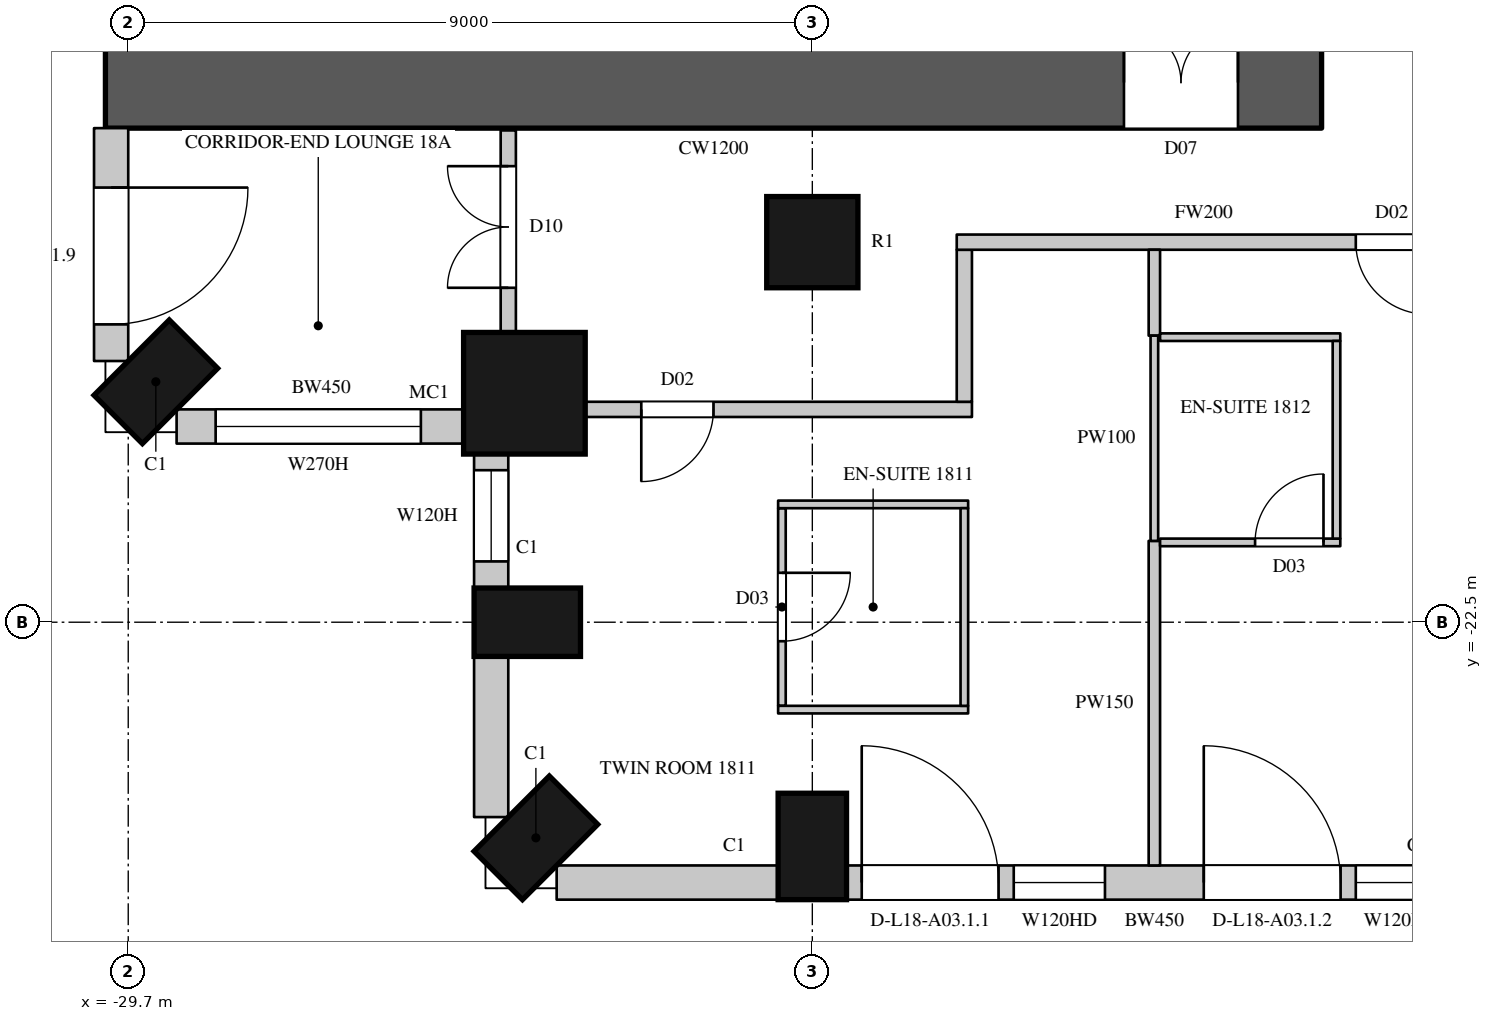
"""IFC4 building model, lengths in metres.
Left out: names, types, materials, properties, quantities, classifications, styles, units other than length and angle.
Written with IfcOpenShell. Run it as: python <this file> out.ifc"""

import sys

from ifc_helpers import new_model, si_unit, direction, frame, frame_2d, origin, origin_2d, place, context, subcontext, project, spatial, rectangle, circle, extrude, element, fill, save


model = new_model("IFC4")
c1 = context("Model", 3, precision=1e-05, world=origin(), true_north=direction((0.0, 1.0)))
c2 = subcontext(c1, "Body", "Model", "MODEL_VIEW")
j1 = project(units=[si_unit("LENGTHUNIT", "METRE"), si_unit("PLANEANGLEUNIT", "RADIAN")], contexts=[c1])
p1 = place(None, origin())
s1 = spatial("IfcSite", under=j1, at=p1, CompositionType="ELEMENT")
p2 = place(p1, origin())
s2 = spatial("IfcBuilding", under=s1, at=p2, CompositionType="ELEMENT")
p3 = place(p2, frame((0.0, 0.0, 95.1)))
s3 = spatial("IfcBuildingStorey", under=s2, at=p3, CompositionType="ELEMENT", Elevation=95.1)
p4 = place(p3, frame((-29.337, -19.337, 0.0), z_axis=(0.0, 0.0, 1.0), x_axis=(0.707106781187, -0.707106781187, 0.0)))
e1 = element("IfcColumn", 1, at=p4, inside=s3, PredefinedType="COLUMN", context=c2, shape_type="SweptSolid", body=[
    extrude(rectangle(XDim=0.9, YDim=1.4, at=origin_2d()), origin(), (0.0, 0.0, 1.0), 3.6),
])
p5 = place(p3, frame((-24.488, -19.488, 0.0), z_axis=(0.0, 0.0, 1.0), x_axis=(1.0, 0.0, 0.0)))
e2 = element("IfcColumn", 2, at=p5, inside=s3, PredefinedType="COLUMN", context=c2, shape_type="SweptSolid", body=[
    extrude(circle(Radius=0.8, at=origin_2d()), origin(), (0.0, 0.0, 1.0), 3.6),
])
for number, where, z_axis, x_axis in (
    (3, (-24.45, -22.5, 0.0), (0.0, 0.0, 1.0), (0.0, -1.0, 0.0)),
    (4, (-24.337, -25.337, 0.0), (0.0, 0.0, 1.0), (0.707, -0.707, 0.0)),
    (5, (-20.7, -25.45, 0.0), (0.0, 0.0, 1.0), (1.0, 0.0, 0.0)),
):
    element("IfcColumn", number, at=place(p3, frame(where, z_axis=z_axis, x_axis=x_axis)), inside=s3, PredefinedType="COLUMN", context=c2, shape_type="SweptSolid", body=[
        extrude(rectangle(XDim=0.9, YDim=1.4, at=origin_2d()), origin(), (0.0, 0.0, 1.0), 3.6),
    ])
p6 = place(p3, frame((-20.7, -17.5, 0.0), z_axis=(0.0, 0.0, 1.0), x_axis=(1.0, 0.0, 0.0)))
e6 = element("IfcColumn", 6, at=p6, inside=s3, PredefinedType="COLUMN", context=c2, shape_type="SweptSolid", body=[
    extrude(circle(Radius=0.6, at=origin_2d()), origin(), (0.0, 0.0, 1.0), 3.6),
])
p7 = place(p3, frame((-29.925, -16.0, 0.0), z_axis=(0.0, 0.0, 1.0), x_axis=(0.0, -1.0, 0.0)))
e7 = element("IfcWall", 7, at=p7, inside=s3, PredefinedType="SOLIDWALL", context=c2, shape_type="SweptSolid", body=[
    extrude(rectangle(XDim=3.064, YDim=0.45, at=frame_2d((1.532, 0.0))), origin(), (0.0, 0.0, 1.0), 3.3),
])
p8 = place(p7, frame((0.782, 0.0, 0.0)))
e8 = element("IfcOpeningElement", 8, at=p8, cuts=e7, PredefinedType="OPENING", context=c2, shape_type="SweptSolid", body=[
    extrude(rectangle(XDim=1.8, YDim=2.4, at=frame_2d((0.9, 1.2))), frame((0.0, 0.235, 0.0), z_axis=(0.0, -1.0, 0.0), x_axis=(1.0, 0.0, 0.0)), (0.0, 0.0, 1.0), 0.47),
])
p9 = place(p3, frame((-29.064, -19.925, 0.0), z_axis=(0.0, 0.0, 1.0), x_axis=(1.0, 0.0, 0.0)))
e9 = element("IfcWall", 9, at=p9, inside=s3, PredefinedType="SOLIDWALL", context=c2, shape_type="SweptSolid", body=[
    extrude(rectangle(XDim=3.805, YDim=0.45, at=frame_2d((1.903, 0.0))), origin(), (0.0, 0.0, 1.0), 3.3),
])
p10 = place(p9, frame((0.514, 0.0, 1.05)))
e10 = element("IfcOpeningElement", 10, at=p10, cuts=e9, PredefinedType="OPENING", context=c2, shape_type="SweptSolid", body=[
    extrude(rectangle(XDim=2.7, YDim=2.0, at=frame_2d((1.35, 1.0))), frame((0.0, 0.235, 0.0), z_axis=(0.0, -1.0, 0.0), x_axis=(1.0, 0.0, 0.0)), (0.0, 0.0, 1.0), 0.47),
])
p11 = place(p3, frame((-24.925, -20.259, 0.0), z_axis=(0.0, 0.0, 1.0), x_axis=(0.0, -1.0, 0.0)))
e11 = element("IfcWall", 11, at=p11, inside=s3, PredefinedType="SOLIDWALL", context=c2, shape_type="SweptSolid", body=[
    extrude(rectangle(XDim=1.792, YDim=0.45, at=frame_2d((0.896, 0.0))), origin(), (0.0, 0.0, 1.0), 3.3),
])
p12 = place(p11, frame((0.241, 0.0, 1.05)))
e12 = element("IfcOpeningElement", 12, at=p12, cuts=e11, PredefinedType="OPENING", context=c2, shape_type="SweptSolid", body=[
    extrude(rectangle(XDim=1.2, YDim=2.0, at=frame_2d((0.6, 1.0))), frame((0.0, 0.235, 0.0), z_axis=(0.0, -1.0, 0.0), x_axis=(1.0, 0.0, 0.0)), (0.0, 0.0, 1.0), 0.47),
])
p13 = place(p3, frame((-24.925, -22.95, 0.0), z_axis=(0.0, 0.0, 1.0), x_axis=(0.0, -1.0, 0.0)))
e13 = element("IfcWall", 13, at=p13, inside=s3, PredefinedType="SOLIDWALL", context=c2, shape_type="SweptSolid", body=[
    extrude(rectangle(XDim=2.114, YDim=0.45, at=frame_2d((1.057, 0.0))), origin(), (0.0, 0.0, 1.0), 3.3),
])
p14 = place(p3, frame((-24.064, -25.925, 0.0), z_axis=(0.0, 0.0, 1.0), x_axis=(1.0, 0.0, 0.0)))
e14 = element("IfcWall", 14, at=p14, inside=s3, PredefinedType="SOLIDWALL", context=c2, shape_type="SweptSolid", body=[
    extrude(rectangle(XDim=2.914, YDim=0.45, at=frame_2d((1.457, 0.0))), origin(), (0.0, 0.0, 1.0), 3.3),
])
p15 = place(p3, frame((-20.25, -25.925, 0.0), z_axis=(0.0, 0.0, 1.0), x_axis=(1.0, 0.0, 0.0)))
e15 = element("IfcWall", 15, at=p15, inside=s3, PredefinedType="SOLIDWALL", context=c2, shape_type="SweptSolid", body=[
    extrude(rectangle(XDim=8.1, YDim=0.45, at=frame_2d((4.05, 0.0))), origin(), (0.0, 0.0, 1.0), 3.3),
])
p16 = place(p15, frame((0.2, 0.0, 0.0)))
e16 = element("IfcOpeningElement", 16, at=p16, cuts=e15, PredefinedType="OPENING", context=c2, shape_type="SweptSolid", body=[
    extrude(rectangle(XDim=1.8, YDim=2.4, at=frame_2d((0.9, 1.2))), frame((0.0, 0.235, 0.0), z_axis=(0.0, -1.0, 0.0), x_axis=(1.0, 0.0, 0.0)), (0.0, 0.0, 1.0), 0.47),
])
p17 = place(p15, frame((2.2, 0.0, 1.05)))
e17 = element("IfcOpeningElement", 17, at=p17, cuts=e15, PredefinedType="OPENING", context=c2, shape_type="SweptSolid", body=[
    extrude(rectangle(XDim=1.2, YDim=2.0, at=frame_2d((0.6, 1.0))), frame((0.0, 0.235, 0.0), z_axis=(0.0, -1.0, 0.0), x_axis=(1.0, 0.0, 0.0)), (0.0, 0.0, 1.0), 0.47),
])
p18 = place(p15, frame((4.7, 0.0, 0.0)))
e18 = element("IfcOpeningElement", 18, at=p18, cuts=e15, PredefinedType="OPENING", context=c2, shape_type="SweptSolid", body=[
    extrude(rectangle(XDim=1.8, YDim=2.4, at=frame_2d((0.9, 1.2))), frame((0.0, 0.235, 0.0), z_axis=(0.0, -1.0, 0.0), x_axis=(1.0, 0.0, 0.0)), (0.0, 0.0, 1.0), 0.47),
])
p19 = place(p15, frame((6.7, 0.0, 1.05)))
e19 = element("IfcOpeningElement", 19, at=p19, cuts=e15, PredefinedType="OPENING", context=c2, shape_type="SweptSolid", body=[
    extrude(rectangle(XDim=1.2, YDim=2.0, at=frame_2d((0.6, 1.0))), frame((0.0, 0.235, 0.0), z_axis=(0.0, -1.0, 0.0), x_axis=(1.0, 0.0, 0.0)), (0.0, 0.0, 1.0), 0.47),
])
p20 = place(p3, frame((-30.0, -15.4, 0.0), z_axis=(0.0, 0.0, 1.0), x_axis=(1.0, 0.0, 0.0)))
e20 = element("IfcWall", 20, at=p20, inside=s3, PredefinedType="SHEAR", context=c2, shape_type="SweptSolid", body=[
    extrude(rectangle(XDim=16.0, YDim=1.2, at=frame_2d((8.0, 0.0))), origin(), (0.0, 0.0, 1.0), 3.6),
])
p21 = place(p20, frame((13.4, 0.0, 0.0)))
e21 = element("IfcOpeningElement", 21, at=p21, cuts=e20, PredefinedType="OPENING", context=c2, shape_type="SweptSolid", body=[
    extrude(rectangle(XDim=1.5, YDim=2.4, at=frame_2d((0.75, 1.2))), frame((0.0, 0.61, 0.0), z_axis=(0.0, -1.0, 0.0), x_axis=(1.0, 0.0, 0.0)), (0.0, 0.0, 1.0), 1.22),
])
p22 = place(p3, frame((-24.7, -18.7, 0.0), z_axis=(0.0, 0.0, 1.0), x_axis=(0.0, 1.0, 0.0)))
e22 = element("IfcWall", 22, at=p22, inside=s3, PredefinedType="PARTITIONING", context=c2, shape_type="SweptSolid", body=[
    extrude(rectangle(XDim=2.67, YDim=0.2, at=frame_2d((1.335, 0.0))), origin(), (0.0, 0.0, 1.0), 3.3),
])
p23 = place(p22, frame((0.6, 0.0, 0.0)))
e23 = element("IfcOpeningElement", 23, at=p23, cuts=e22, PredefinedType="OPENING", context=c2, shape_type="SweptSolid", body=[
    extrude(rectangle(XDim=1.6, YDim=2.4, at=frame_2d((0.8, 1.2))), frame((0.0, 0.11, 0.0), z_axis=(0.0, -1.0, 0.0), x_axis=(1.0, 0.0, 0.0)), (0.0, 0.0, 1.0), 0.22),
])
p24 = place(p3, frame((-23.7, -19.7, 0.0), z_axis=(0.0, 0.0, 1.0), x_axis=(1.0, 0.0, 0.0)))
e24 = element("IfcWall", 24, at=p24, inside=s3, PredefinedType="PARTITIONING", context=c2, shape_type="SweptSolid", body=[
    extrude(rectangle(XDim=5.1, YDim=0.2, at=frame_2d((2.55, 0.0))), origin(), (0.0, 0.0, 1.0), 3.3),
])
p25 = place(p24, frame((0.75, 0.0, 0.0)))
e25 = element("IfcOpeningElement", 25, at=p25, cuts=e24, PredefinedType="OPENING", context=c2, shape_type="SweptSolid", body=[
    extrude(rectangle(XDim=0.95, YDim=2.2, at=frame_2d((0.475, 1.1))), frame((0.0, 0.11, 0.0), z_axis=(0.0, -1.0, 0.0), x_axis=(1.0, 0.0, 0.0)), (0.0, 0.0, 1.0), 0.22),
])
p26 = place(p3, frame((-18.7, -19.6, 0.0), z_axis=(0.0, 0.0, 1.0), x_axis=(0.0, 1.0, 0.0)))
e26 = element("IfcWall", 26, at=p26, inside=s3, PredefinedType="PARTITIONING", context=c2, shape_type="SweptSolid", body=[
    extrude(rectangle(XDim=2.0, YDim=0.2, at=frame_2d((1.0, 0.0))), origin(), (0.0, 0.0, 1.0), 3.3),
])
p27 = place(p3, frame((-18.8, -17.5, 0.0), z_axis=(0.0, 0.0, 1.0), x_axis=(1.0, 0.0, 0.0)))
e27 = element("IfcWall", 27, at=p27, inside=s3, PredefinedType="PARTITIONING", context=c2, shape_type="SweptSolid", body=[
    extrude(rectangle(XDim=6.5, YDim=0.2, at=frame_2d((3.25, 0.0))), origin(), (0.0, 0.0, 1.0), 2.75),
])
p28 = place(p27, frame((5.25, 0.0, 0.0)))
e28 = element("IfcOpeningElement", 28, at=p28, cuts=e27, PredefinedType="OPENING", context=c2, shape_type="SweptSolid", body=[
    extrude(rectangle(XDim=0.95, YDim=2.2, at=frame_2d((0.475, 1.1))), frame((0.0, 0.11, 0.0), z_axis=(0.0, -1.0, 0.0), x_axis=(1.0, 0.0, 0.0)), (0.0, 0.0, 1.0), 0.22),
])
p29 = place(p3, frame((-16.2, -25.7, 0.0), z_axis=(0.0, 0.0, 1.0), x_axis=(0.0, 1.0, 0.0)))
e29 = element("IfcWall", 29, at=p29, inside=s3, PredefinedType="PARTITIONING", context=c2, shape_type="SweptSolid", body=[
    extrude(rectangle(XDim=4.27, YDim=0.15, at=frame_2d((2.135, 0.0))), origin(), (0.0, 0.0, 1.0), 2.65),
])
p30 = place(p3, frame((-16.2, -18.73, 0.0), z_axis=(0.0, 0.0, 1.0), x_axis=(0.0, 1.0, 0.0)))
e30 = element("IfcWall", 30, at=p30, inside=s3, PredefinedType="PARTITIONING", context=c2, shape_type="SweptSolid", body=[
    extrude(rectangle(XDim=1.13, YDim=0.15, at=frame_2d((0.565, 0.0))), origin(), (0.0, 0.0, 1.0), 2.65),
])
p31 = place(p3, frame((-21.1, -23.6, 0.0), z_axis=(0.0, 0.0, 1.0), x_axis=(0.0, 1.0, 0.0)))
e31 = element("IfcWall", 31, at=p31, inside=s3, PredefinedType="PARTITIONING", context=c2, shape_type="SweptSolid", body=[
    extrude(rectangle(XDim=2.6, YDim=0.1, at=frame_2d((1.3, 0.0))), origin(), (0.0, 0.0, 1.0), 3.3),
])
p32 = place(p31, frame((0.85, 0.0, 0.0)))
e32 = element("IfcOpeningElement", 32, at=p32, cuts=e31, PredefinedType="OPENING", context=c2, shape_type="SweptSolid", body=[
    extrude(rectangle(XDim=0.9, YDim=2.2, at=frame_2d((0.45, 1.1))), frame((0.0, 0.06, 0.0), z_axis=(0.0, -1.0, 0.0), x_axis=(1.0, 0.0, 0.0)), (0.0, 0.0, 1.0), 0.12),
])
for number, where, z_axis, x_axis in (
    (33, (-21.15, -23.65, 0.0), (0.0, 0.0, 1.0), (1.0, 0.0, 0.0)),
    (34, (-21.15, -20.95, 0.0), (0.0, 0.0, 1.0), (1.0, 0.0, 0.0)),
):
    element("IfcWall", number, at=place(p3, frame(where, z_axis=z_axis, x_axis=x_axis)), inside=s3, PredefinedType="PARTITIONING", context=c2, shape_type="SweptSolid", body=[
        extrude(rectangle(XDim=2.5, YDim=0.1, at=frame_2d((1.25, 0.0))), origin(), (0.0, 0.0, 1.0), 3.3),
    ])
p33 = place(p3, frame((-18.7, -23.6, 0.0), z_axis=(0.0, 0.0, 1.0), x_axis=(0.0, 1.0, 0.0)))
e35 = element("IfcWall", 35, at=p33, inside=s3, PredefinedType="PARTITIONING", context=c2, shape_type="SweptSolid", body=[
    extrude(rectangle(XDim=2.6, YDim=0.1, at=frame_2d((1.3, 0.0))), origin(), (0.0, 0.0, 1.0), 3.3),
])
p34 = place(p3, frame((-16.2, -21.43, 0.0), z_axis=(0.0, 0.0, 1.0), x_axis=(0.0, 1.0, 0.0)))
e36 = element("IfcWall", 36, at=p34, inside=s3, PredefinedType="PARTITIONING", context=c2, shape_type="SweptSolid", body=[
    extrude(rectangle(XDim=2.7, YDim=0.1, at=frame_2d((1.35, 0.0))), origin(), (0.0, 0.0, 1.0), 2.65),
])
p35 = place(p3, frame((-16.125, -21.45, 0.0), z_axis=(0.0, 0.0, 1.0), x_axis=(1.0, 0.0, 0.0)))
e37 = element("IfcWall", 37, at=p35, inside=s3, PredefinedType="PARTITIONING", context=c2, shape_type="SweptSolid", body=[
    extrude(rectangle(XDim=2.371, YDim=0.1, at=frame_2d((1.186, 0.0))), origin(), (0.0, 0.0, 1.0), 3.3),
])
p36 = place(p35, frame((1.25, 0.0, 0.0)))
e38 = element("IfcOpeningElement", 38, at=p36, cuts=e37, PredefinedType="OPENING", context=c2, shape_type="SweptSolid", body=[
    extrude(rectangle(XDim=0.9, YDim=2.2, at=frame_2d((0.45, 1.1))), frame((0.0, 0.06, 0.0), z_axis=(0.0, -1.0, 0.0), x_axis=(1.0, 0.0, 0.0)), (0.0, 0.0, 1.0), 0.12),
])
p37 = place(p3, frame((-16.125, -18.75, 0.0), z_axis=(0.0, 0.0, 1.0), x_axis=(1.0, 0.0, 0.0)))
e39 = element("IfcWall", 39, at=p37, inside=s3, PredefinedType="PARTITIONING", context=c2, shape_type="SweptSolid", body=[
    extrude(rectangle(XDim=2.371, YDim=0.1, at=frame_2d((1.186, 0.0))), origin(), (0.0, 0.0, 1.0), 3.3),
])
p38 = place(p3, frame((-13.804, -21.4, 0.0), z_axis=(0.0, 0.0, 1.0), x_axis=(0.0, 1.0, 0.0)))
e40 = element("IfcWall", 40, at=p38, inside=s3, PredefinedType="PARTITIONING", context=c2, shape_type="SweptSolid", body=[
    extrude(rectangle(XDim=2.6, YDim=0.1, at=frame_2d((1.3, 0.0))), origin(), (0.0, 0.0, 1.0), 3.3),
])
p39 = place(p8, origin())
e41 = element("IfcDoor", 41, at=p39, inside=s3, OperationType="SLIDING_TO_LEFT", PredefinedType="DOOR", context=c2, shape_type="SweptSolid", body=[
    extrude(rectangle(XDim=1.8, YDim=2.4, at=frame_2d((0.9, 1.2))), frame((0.0, 0.13, 0.0), z_axis=(0.0, -1.0, 0.0), x_axis=(1.0, 0.0, 0.0)), (0.0, 0.0, 1.0), 0.05),
])
fill(e8, e41)
p40 = place(p10, origin())
e42 = element("IfcWindow", 42, at=p40, inside=s3, PartitioningType="SINGLE_PANEL", PredefinedType="WINDOW", context=c2, shape_type="SweptSolid", body=[
    extrude(rectangle(XDim=2.7, YDim=2.0, at=frame_2d((1.35, 1.0))), frame((0.0, 0.135, 0.0), z_axis=(0.0, -1.0, 0.0), x_axis=(1.0, 0.0, 0.0)), (0.0, 0.0, 1.0), 0.06),
])
fill(e10, e42)
p41 = place(p12, origin())
e43 = element("IfcWindow", 43, at=p41, inside=s3, PartitioningType="SINGLE_PANEL", PredefinedType="WINDOW", context=c2, shape_type="SweptSolid", body=[
    extrude(rectangle(XDim=1.2, YDim=2.0, at=frame_2d((0.6, 1.0))), frame((0.0, 0.135, 0.0), z_axis=(0.0, -1.0, 0.0), x_axis=(1.0, 0.0, 0.0)), (0.0, 0.0, 1.0), 0.06),
])
fill(e12, e43)
p42 = place(p16, origin())
e44 = element("IfcDoor", 44, at=p42, inside=s3, OperationType="SLIDING_TO_LEFT", PredefinedType="DOOR", context=c2, shape_type="SweptSolid", body=[
    extrude(rectangle(XDim=1.8, YDim=2.4, at=frame_2d((0.9, 1.2))), frame((0.0, 0.13, 0.0), z_axis=(0.0, -1.0, 0.0), x_axis=(1.0, 0.0, 0.0)), (0.0, 0.0, 1.0), 0.05),
])
fill(e16, e44)
p43 = place(p17, origin())
e45 = element("IfcWindow", 45, at=p43, inside=s3, PartitioningType="SINGLE_PANEL", PredefinedType="WINDOW", context=c2, shape_type="SweptSolid", body=[
    extrude(rectangle(XDim=1.2, YDim=2.0, at=frame_2d((0.6, 1.0))), frame((0.0, 0.135, 0.0), z_axis=(0.0, -1.0, 0.0), x_axis=(1.0, 0.0, 0.0)), (0.0, 0.0, 1.0), 0.06),
])
fill(e17, e45)
p44 = place(p18, origin())
e46 = element("IfcDoor", 46, at=p44, inside=s3, OperationType="SLIDING_TO_LEFT", PredefinedType="DOOR", context=c2, shape_type="SweptSolid", body=[
    extrude(rectangle(XDim=1.8, YDim=2.4, at=frame_2d((0.9, 1.2))), frame((0.0, 0.13, 0.0), z_axis=(0.0, -1.0, 0.0), x_axis=(1.0, 0.0, 0.0)), (0.0, 0.0, 1.0), 0.05),
])
fill(e18, e46)
p45 = place(p19, origin())
e47 = element("IfcWindow", 47, at=p45, inside=s3, PartitioningType="SINGLE_PANEL", PredefinedType="WINDOW", context=c2, shape_type="SweptSolid", body=[
    extrude(rectangle(XDim=1.2, YDim=2.0, at=frame_2d((0.6, 1.0))), frame((0.0, 0.135, 0.0), z_axis=(0.0, -1.0, 0.0), x_axis=(1.0, 0.0, 0.0)), (0.0, 0.0, 1.0), 0.06),
])
fill(e19, e47)
p46 = place(p23, origin())
e48 = element("IfcDoor", 48, at=p46, inside=s3, OperationType="DOUBLE_DOOR_SINGLE_SWING", PredefinedType="DOOR", context=c2, shape_type="SweptSolid", body=[
    extrude(rectangle(XDim=1.6, YDim=2.4, at=frame_2d((0.8, 1.2))), frame((0.0, 0.025, 0.0), z_axis=(0.0, -1.0, 0.0), x_axis=(1.0, 0.0, 0.0)), (0.0, 0.0, 1.0), 0.05),
])
fill(e23, e48)
p47 = place(p25, origin())
e49 = element("IfcDoor", 49, at=p47, inside=s3, OperationType="SINGLE_SWING_RIGHT", PredefinedType="DOOR", context=c2, shape_type="SweptSolid", body=[
    extrude(rectangle(XDim=0.95, YDim=2.2, at=frame_2d((0.475, 1.1))), frame((0.0, 0.025, 0.0), z_axis=(0.0, -1.0, 0.0), x_axis=(1.0, 0.0, 0.0)), (0.0, 0.0, 1.0), 0.05),
])
fill(e25, e49)
p48 = place(p32, origin())
e50 = element("IfcDoor", 50, at=p48, inside=s3, OperationType="SINGLE_SWING_LEFT", PredefinedType="DOOR", context=c2, shape_type="SweptSolid", body=[
    extrude(rectangle(XDim=0.9, YDim=2.2, at=frame_2d((0.45, 1.1))), frame((0.0, 0.025, 0.0), z_axis=(0.0, -1.0, 0.0), x_axis=(1.0, 0.0, 0.0)), (0.0, 0.0, 1.0), 0.05),
])
fill(e32, e50)
p49 = place(p28, origin())
e51 = element("IfcDoor", 51, at=p49, inside=s3, OperationType="SINGLE_SWING_LEFT", PredefinedType="DOOR", context=c2, shape_type="SweptSolid", body=[
    extrude(rectangle(XDim=0.95, YDim=2.2, at=frame_2d((0.475, 1.1))), frame((0.0, 0.025, 0.0), z_axis=(0.0, -1.0, 0.0), x_axis=(1.0, 0.0, 0.0)), (0.0, 0.0, 1.0), 0.05),
])
fill(e28, e51)
p50 = place(p36, origin())
e52 = element("IfcDoor", 52, at=p50, inside=s3, OperationType="SINGLE_SWING_RIGHT", PredefinedType="DOOR", context=c2, shape_type="SweptSolid", body=[
    extrude(rectangle(XDim=0.9, YDim=2.2, at=frame_2d((0.45, 1.1))), frame((0.0, 0.025, 0.0), z_axis=(0.0, -1.0, 0.0), x_axis=(1.0, 0.0, 0.0)), (0.0, 0.0, 1.0), 0.05),
])
fill(e38, e52)
p51 = place(p21, origin())
e53 = element("IfcDoor", 53, at=p51, inside=s3, OperationType="DOUBLE_DOOR_SINGLE_SWING", PredefinedType="DOOR", context=c2, shape_type="SweptSolid", body=[
    extrude(rectangle(XDim=1.5, YDim=2.4, at=frame_2d((0.75, 1.2))), frame((0.0, 0.025, 0.0), z_axis=(0.0, -1.0, 0.0), x_axis=(1.0, 0.0, 0.0)), (0.0, 0.0, 1.0), 0.05),
])
fill(e21, e53)
save(model, sys.argv[1])
